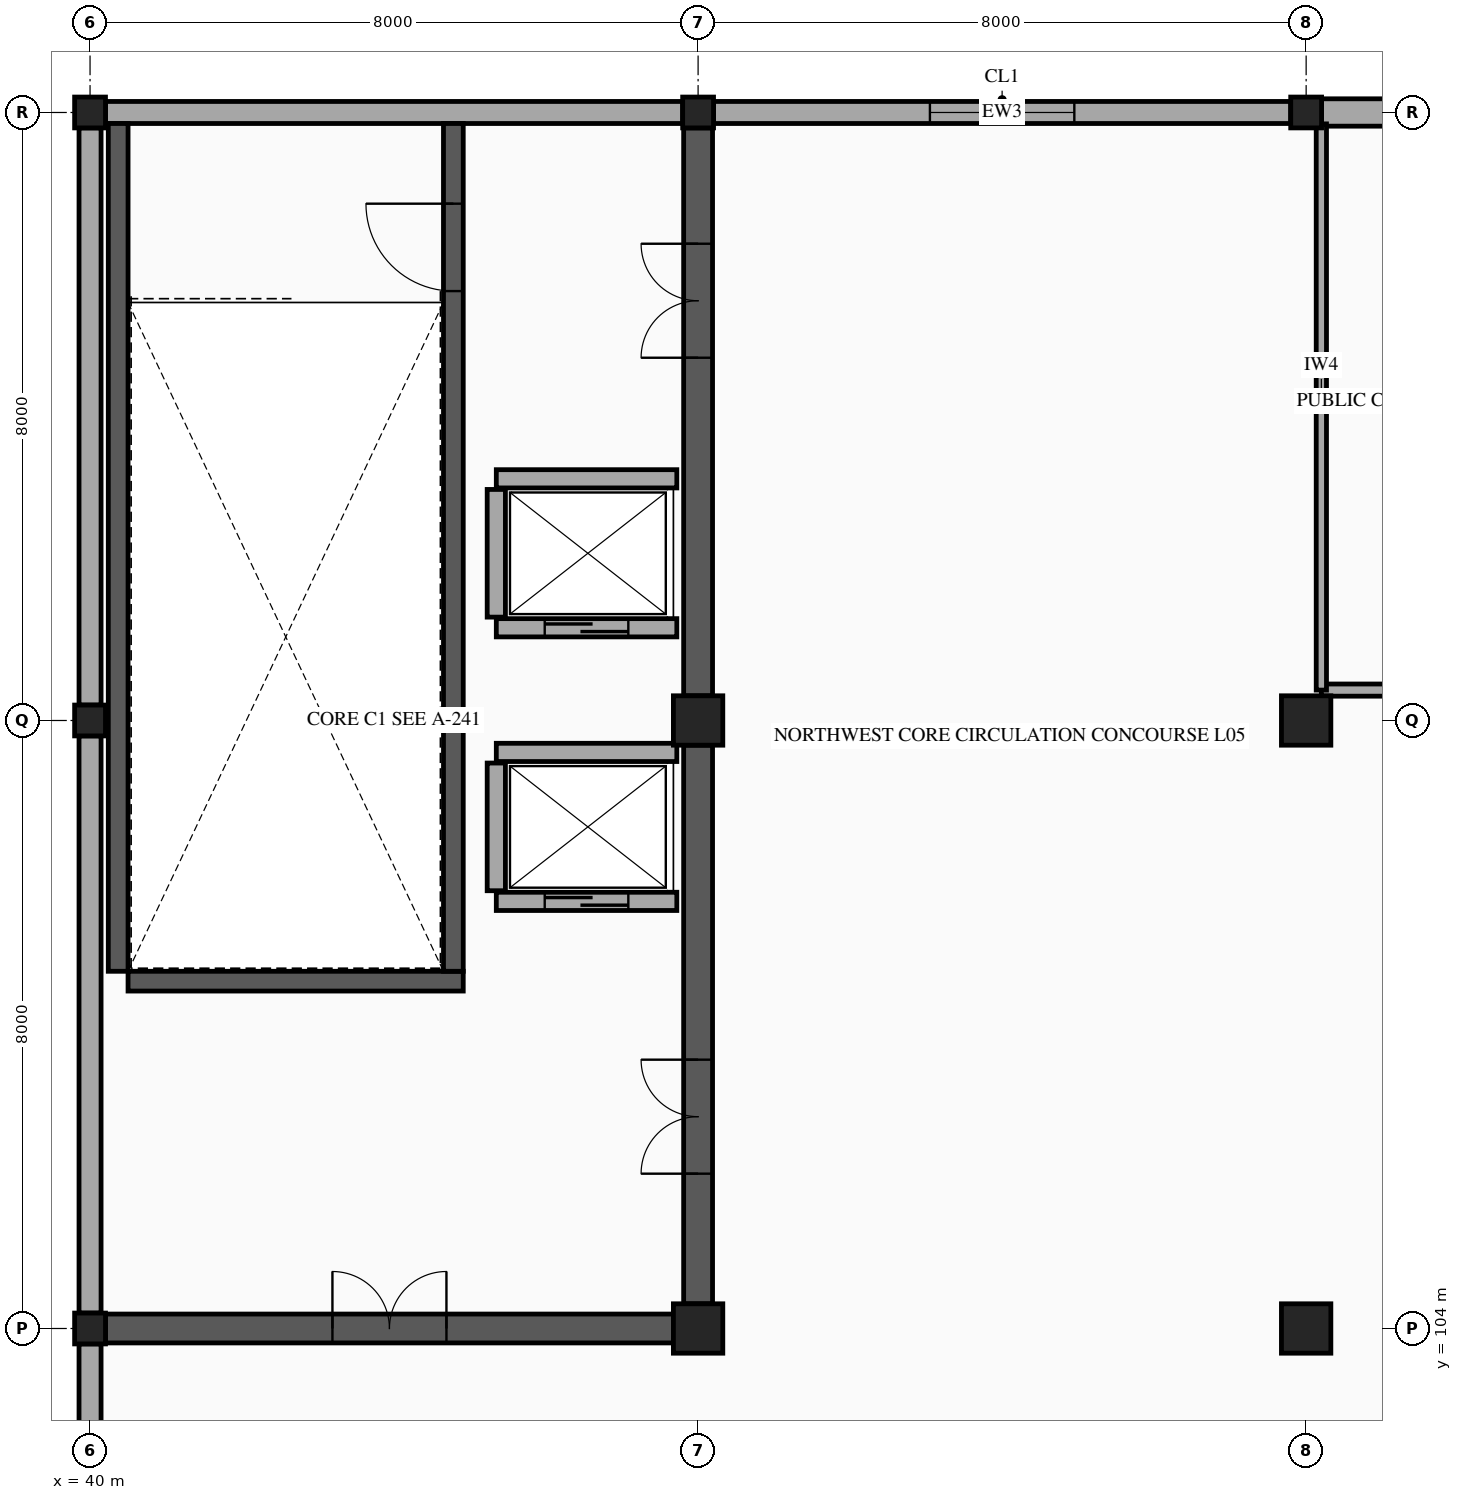
"""IFC4 building model, lengths in metres.
Left out: names, types, materials, properties, quantities, classifications, styles, units other than length and angle.
Written with IfcOpenShell. Run it as: python <this file> out.ifc"""

import sys

from ifc_helpers import new_model, si_unit, direction, frame, frame_2d, origin, origin_2d, place, context, subcontext, project, spatial, rectangle, hollow_rectangle, extrude, element, fill, save


model = new_model("IFC4")
c1 = context("Model", 3, precision=1e-05, world=origin(), true_north=direction((0.0, 1.0)))
c2 = subcontext(c1, "Body", "Model", "MODEL_VIEW")
j1 = project(units=[si_unit("LENGTHUNIT", "METRE"), si_unit("PLANEANGLEUNIT", "RADIAN")], contexts=[c1])
p1 = place(None, origin())
s1 = spatial("IfcSite", under=j1, at=p1, CompositionType="ELEMENT")
p2 = place(p1, origin())
s2 = spatial("IfcBuilding", under=s1, at=p2, CompositionType="ELEMENT")
p3 = place(p2, frame((0.0, 0.0, 23.9)))
s3 = spatial("IfcBuildingStorey", under=s2, at=p3, CompositionType="ELEMENT", Elevation=23.9)
for number, where, z_axis, x_axis in (
    (1, (40.0, 104.0, 0.0), (0.0, 0.0, 1.0), (1.0, 0.0, 0.0)),
    (2, (40.0, 112.0, 0.0), (0.0, 0.0, 1.0), (1.0, 0.0, 0.0)),
    (3, (40.0, 120.0, 0.0), (0.0, 0.0, 1.0), (1.0, 0.0, 0.0)),
):
    element("IfcColumn", number, at=place(p3, frame(where, z_axis=z_axis, x_axis=x_axis)), inside=s3, PredefinedType="COLUMN", context=c2, shape_type="SweptSolid", body=[
        extrude(hollow_rectangle(XDim=0.406, YDim=0.406, WallThickness=0.015, InnerFilletRadius=0.015, OuterFilletRadius=0.029, at=origin_2d()), origin(), (0.0, 0.0, 1.0), 4.5),
    ])
for number, where, z_axis, x_axis in (
    (4, (48.0, 104.0, 0.0), (0.0, 0.0, 1.0), (1.0, 0.0, 0.0)),
    (5, (48.0, 112.0, 0.0), (0.0, 0.0, 1.0), (1.0, 0.0, 0.0)),
):
    element("IfcColumn", number, at=place(p3, frame(where, z_axis=z_axis, x_axis=x_axis)), inside=s3, PredefinedType="COLUMN", context=c2, shape_type="SweptSolid", body=[
        extrude(rectangle(XDim=0.65, YDim=0.65, at=origin_2d()), origin(), (0.0, 0.0, 1.0), 4.5),
    ])
p4 = place(p3, frame((48.0, 120.0, 0.0), z_axis=(0.0, 0.0, 1.0), x_axis=(1.0, 0.0, 0.0)))
e6 = element("IfcColumn", 6, at=p4, inside=s3, PredefinedType="COLUMN", context=c2, shape_type="SweptSolid", body=[
    extrude(hollow_rectangle(XDim=0.406, YDim=0.406, WallThickness=0.015, InnerFilletRadius=0.015, OuterFilletRadius=0.029, at=origin_2d()), origin(), (0.0, 0.0, 1.0), 4.5),
])
for number, where, z_axis, x_axis in (
    (7, (56.0, 104.0, 0.0), (0.0, 0.0, 1.0), (1.0, 0.0, 0.0)),
    (8, (56.0, 112.0, 0.0), (0.0, 0.0, 1.0), (1.0, 0.0, 0.0)),
):
    element("IfcColumn", number, at=place(p3, frame(where, z_axis=z_axis, x_axis=x_axis)), inside=s3, PredefinedType="COLUMN", context=c2, shape_type="SweptSolid", body=[
        extrude(rectangle(XDim=0.65, YDim=0.65, at=origin_2d()), origin(), (0.0, 0.0, 1.0), 4.5),
    ])
p5 = place(p3, frame((56.0, 120.0, 0.0), z_axis=(0.0, 0.0, 1.0), x_axis=(1.0, 0.0, 0.0)))
e9 = element("IfcColumn", 9, at=p5, inside=s3, PredefinedType="COLUMN", context=c2, shape_type="SweptSolid", body=[
    extrude(hollow_rectangle(XDim=0.406, YDim=0.406, WallThickness=0.015, InnerFilletRadius=0.015, OuterFilletRadius=0.029, at=origin_2d()), origin(), (0.0, 0.0, 1.0), 4.5),
])
p6 = place(p3, frame((40.0, 96.203, 0.0), z_axis=(0.0, 0.0, 1.0), x_axis=(0.0, 1.0, 0.0)))
e10 = element("IfcWall", 10, at=p6, inside=s3, PredefinedType="STANDARD", context=c2, shape_type="SweptSolid", body=[
    extrude(rectangle(XDim=7.594, YDim=0.29, at=frame_2d((3.797, 0.0))), origin(), (0.0, 0.0, 1.0), 3.48),
])
p7 = place(p6, frame((2.597, 0.0, 0.8)))
e11 = element("IfcOpeningElement", 11, at=p7, cuts=e10, PredefinedType="OPENING", context=c2, shape_type="SweptSolid", body=[
    extrude(rectangle(XDim=2.4, YDim=1.8, at=frame_2d((1.2, 0.9))), frame((0.0, 0.155, 0.0), z_axis=(0.0, -1.0, 0.0), x_axis=(1.0, 0.0, 0.0)), (0.0, 0.0, 1.0), 0.31),
])
for number, where, z_axis, x_axis in (
    (12, (40.0, 104.203, 0.0), (0.0, 0.0, 1.0), (0.0, 1.0, 0.0)),
    (13, (40.0, 112.203, 0.0), (0.0, 0.0, 1.0), (0.0, 1.0, 0.0)),
    (14, (40.203, 120.0, 0.0), (0.0, 0.0, 1.0), (1.0, 0.0, 0.0)),
):
    element("IfcWall", number, at=place(p3, frame(where, z_axis=z_axis, x_axis=x_axis)), inside=s3, PredefinedType="STANDARD", context=c2, shape_type="SweptSolid", body=[
        extrude(rectangle(XDim=7.594, YDim=0.29, at=frame_2d((3.797, 0.0))), origin(), (0.0, 0.0, 1.0), 3.48),
    ])
p8 = place(p3, frame((48.203, 120.0, 0.0), z_axis=(0.0, 0.0, 1.0), x_axis=(1.0, 0.0, 0.0)))
e15 = element("IfcWall", 15, at=p8, inside=s3, PredefinedType="STANDARD", context=c2, shape_type="SweptSolid", body=[
    extrude(rectangle(XDim=7.594, YDim=0.29, at=frame_2d((3.797, 0.0))), origin(), (0.0, 0.0, 1.0), 3.48),
])
p9 = place(p8, frame((2.847, 0.0, 0.8)))
e16 = element("IfcOpeningElement", 16, at=p9, cuts=e15, PredefinedType="OPENING", context=c2, shape_type="SweptSolid", body=[
    extrude(rectangle(XDim=1.9, YDim=1.85, at=frame_2d((0.95, 0.925))), frame((0.0, 0.155, 0.0), z_axis=(0.0, -1.0, 0.0), x_axis=(1.0, 0.0, 0.0)), (0.0, 0.0, 1.0), 0.31),
])
p10 = place(p3, frame((56.203, 120.0, 0.0), z_axis=(0.0, 0.0, 1.0), x_axis=(1.0, 0.0, 0.0)))
e17 = element("IfcWall", 17, at=p10, inside=s3, PredefinedType="SOLIDWALL", context=c2, shape_type="SweptSolid", body=[
    extrude(rectangle(XDim=7.594, YDim=0.36, at=frame_2d((3.797, 0.0))), origin(), (0.0, 0.0, 1.0), 3.48),
])
p11 = place(p3, frame((40.5, 108.57, 0.0), z_axis=(0.0, 0.0, 1.0), x_axis=(1.0, 0.0, 0.0)))
e18 = element("IfcWall", 18, at=p11, inside=s3, PredefinedType="SHEAR", context=c2, shape_type="SweptSolid", body=[
    extrude(rectangle(XDim=4.41, YDim=0.26, at=frame_2d((2.205, 0.0))), origin(), (0.0, 0.0, 1.0), 4.28),
])
p12 = place(p3, frame((40.37, 108.7, 0.0), z_axis=(0.0, 0.0, 1.0), x_axis=(0.0, 1.0, 0.0)))
e19 = element("IfcWall", 19, at=p12, inside=s3, PredefinedType="SHEAR", context=c2, shape_type="SweptSolid", body=[
    extrude(rectangle(XDim=11.155, YDim=0.26, at=frame_2d((5.578, 0.0))), origin(), (0.0, 0.0, 1.0), 4.28),
])
p13 = place(p3, frame((44.78, 108.7, 0.0), z_axis=(0.0, 0.0, 1.0), x_axis=(0.0, 1.0, 0.0)))
e20 = element("IfcWall", 20, at=p13, inside=s3, PredefinedType="SHEAR", context=c2, shape_type="SweptSolid", body=[
    extrude(rectangle(XDim=11.155, YDim=0.26, at=frame_2d((5.578, 0.0))), origin(), (0.0, 0.0, 1.0), 4.28),
])
p14 = place(p13, frame((8.95, 0.0, 0.0)))
e21 = element("IfcOpeningElement", 21, at=p14, cuts=e20, PredefinedType="OPENING", context=c2, shape_type="SweptSolid", body=[
    extrude(rectangle(XDim=1.15, YDim=2.15, at=frame_2d((0.575, 1.075))), frame((0.0, 0.14, 0.0), z_axis=(0.0, -1.0, 0.0), x_axis=(1.0, 0.0, 0.0)), (0.0, 0.0, 1.0), 0.28),
])
p15 = place(p3, frame((40.203, 104.0, 0.0), z_axis=(0.0, 0.0, 1.0), x_axis=(1.0, 0.0, 0.0)))
e22 = element("IfcWall", 22, at=p15, inside=s3, PredefinedType="SHEAR", context=c2, shape_type="SweptSolid", body=[
    extrude(rectangle(XDim=7.472, YDim=0.38, at=frame_2d((3.736, 0.0))), origin(), (0.0, 0.0, 1.0), 4.28),
])
p16 = place(p15, frame((2.986, 0.0, 0.0)))
e23 = element("IfcOpeningElement", 23, at=p16, cuts=e22, PredefinedType="OPENING", context=c2, shape_type="SweptSolid", body=[
    extrude(rectangle(XDim=1.5, YDim=2.15, at=frame_2d((0.75, 1.075))), frame((0.0, 0.2, 0.0), z_axis=(0.0, -1.0, 0.0), x_axis=(1.0, 0.0, 0.0)), (0.0, 0.0, 1.0), 0.4),
])
p17 = place(p3, frame((48.0, 104.325, 0.0), z_axis=(0.0, 0.0, 1.0), x_axis=(0.0, 1.0, 0.0)))
e24 = element("IfcWall", 24, at=p17, inside=s3, PredefinedType="SHEAR", context=c2, shape_type="SweptSolid", body=[
    extrude(rectangle(XDim=7.35, YDim=0.38, at=frame_2d((3.675, 0.0))), origin(), (0.0, 0.0, 1.0), 4.28),
])
p18 = place(p17, frame((1.712, 0.0, 0.0)))
e25 = element("IfcOpeningElement", 25, at=p18, cuts=e24, PredefinedType="OPENING", context=c2, shape_type="SweptSolid", body=[
    extrude(rectangle(XDim=1.5, YDim=2.15, at=frame_2d((0.75, 1.075))), frame((0.0, 0.2, 0.0), z_axis=(0.0, -1.0, 0.0), x_axis=(1.0, 0.0, 0.0)), (0.0, 0.0, 1.0), 0.4),
])
p19 = place(p3, frame((48.0, 112.325, 0.0), z_axis=(0.0, 0.0, 1.0), x_axis=(0.0, 1.0, 0.0)))
e26 = element("IfcWall", 26, at=p19, inside=s3, PredefinedType="SHEAR", context=c2, shape_type="SweptSolid", body=[
    extrude(rectangle(XDim=7.472, YDim=0.38, at=frame_2d((3.736, 0.0))), origin(), (0.0, 0.0, 1.0), 4.28),
])
p20 = place(p19, frame((4.448, 0.0, 0.0)))
e27 = element("IfcOpeningElement", 27, at=p20, cuts=e26, PredefinedType="OPENING", context=c2, shape_type="SweptSolid", body=[
    extrude(rectangle(XDim=1.5, YDim=2.15, at=frame_2d((0.75, 1.075))), frame((0.0, 0.2, 0.0), z_axis=(0.0, -1.0, 0.0), x_axis=(1.0, 0.0, 0.0)), (0.0, 0.0, 1.0), 0.4),
])
p21 = place(p3, frame((45.345, 113.22, 0.0), z_axis=(0.0, 0.0, 1.0), x_axis=(1.0, 0.0, 0.0)))
e28 = element("IfcWall", 28, at=p21, inside=s3, PredefinedType="PARTITIONING", context=c2, shape_type="SweptSolid", body=[
    extrude(rectangle(XDim=2.375, YDim=0.24, at=frame_2d((1.188, 0.0))), origin(), (0.0, 0.0, 1.0), 4.28),
])
p22 = place(p21, frame((0.637, 0.0, 0.0)))
e29 = element("IfcOpeningElement", 29, at=p22, cuts=e28, PredefinedType="OPENING", context=c2, shape_type="SweptSolid", body=[
    extrude(rectangle(XDim=1.1, YDim=2.15, at=frame_2d((0.55, 1.075))), frame((0.0, 0.13, 0.0), z_axis=(0.0, -1.0, 0.0), x_axis=(1.0, 0.0, 0.0)), (0.0, 0.0, 1.0), 0.26),
])
p23 = place(p3, frame((45.345, 115.18, 0.0), z_axis=(0.0, 0.0, 1.0), x_axis=(1.0, 0.0, 0.0)))
e30 = element("IfcWall", 30, at=p23, inside=s3, PredefinedType="PARTITIONING", context=c2, shape_type="SweptSolid", body=[
    extrude(rectangle(XDim=2.375, YDim=0.24, at=frame_2d((1.188, 0.0))), origin(), (0.0, 0.0, 1.0), 4.28),
])
p24 = place(p3, frame((45.345, 113.36, 0.0), z_axis=(0.0, 0.0, 1.0), x_axis=(0.0, 1.0, 0.0)))
e31 = element("IfcWall", 31, at=p24, inside=s3, PredefinedType="PARTITIONING", context=c2, shape_type="SweptSolid", body=[
    extrude(rectangle(XDim=1.68, YDim=0.24, at=frame_2d((0.84, 0.0))), origin(), (0.0, 0.0, 1.0), 4.28),
])
p25 = place(p3, frame((45.345, 109.62, 0.0), z_axis=(0.0, 0.0, 1.0), x_axis=(1.0, 0.0, 0.0)))
e32 = element("IfcWall", 32, at=p25, inside=s3, PredefinedType="PARTITIONING", context=c2, shape_type="SweptSolid", body=[
    extrude(rectangle(XDim=2.375, YDim=0.24, at=frame_2d((1.188, 0.0))), origin(), (0.0, 0.0, 1.0), 4.28),
])
p26 = place(p25, frame((0.637, 0.0, 0.0)))
e33 = element("IfcOpeningElement", 33, at=p26, cuts=e32, PredefinedType="OPENING", context=c2, shape_type="SweptSolid", body=[
    extrude(rectangle(XDim=1.1, YDim=2.15, at=frame_2d((0.55, 1.075))), frame((0.0, 0.13, 0.0), z_axis=(0.0, -1.0, 0.0), x_axis=(1.0, 0.0, 0.0)), (0.0, 0.0, 1.0), 0.26),
])
p27 = place(p3, frame((45.345, 111.58, 0.0), z_axis=(0.0, 0.0, 1.0), x_axis=(1.0, 0.0, 0.0)))
e34 = element("IfcWall", 34, at=p27, inside=s3, PredefinedType="PARTITIONING", context=c2, shape_type="SweptSolid", body=[
    extrude(rectangle(XDim=2.375, YDim=0.24, at=frame_2d((1.188, 0.0))), origin(), (0.0, 0.0, 1.0), 4.28),
])
p28 = place(p3, frame((45.345, 109.76, 0.0), z_axis=(0.0, 0.0, 1.0), x_axis=(0.0, 1.0, 0.0)))
e35 = element("IfcWall", 35, at=p28, inside=s3, PredefinedType="PARTITIONING", context=c2, shape_type="SweptSolid", body=[
    extrude(rectangle(XDim=1.68, YDim=0.24, at=frame_2d((0.84, 0.0))), origin(), (0.0, 0.0, 1.0), 4.28),
])
p29 = place(p3, frame((56.2, 112.4, 0.0), z_axis=(0.0, 0.0, 1.0), x_axis=(1.0, 0.0, 0.0)))
e36 = element("IfcWall", 36, at=p29, inside=s3, PredefinedType="PARTITIONING", context=c2, shape_type="SweptSolid", body=[
    extrude(rectangle(XDim=4.7, YDim=0.16, at=frame_2d((2.35, 0.0))), origin(), (0.0, 0.0, 1.0), 3.48),
])
p30 = place(p29, frame((3.193, 0.0, 0.0)))
e37 = element("IfcOpeningElement", 37, at=p30, cuts=e36, PredefinedType="OPENING", context=c2, shape_type="SweptSolid", body=[
    extrude(rectangle(XDim=0.92, YDim=2.1, at=frame_2d((0.46, 1.05))), frame((0.0, 0.09, 0.0), z_axis=(0.0, -1.0, 0.0), x_axis=(1.0, 0.0, 0.0)), (0.0, 0.0, 1.0), 0.18),
])
p31 = place(p3, frame((56.2, 112.4, 0.0), z_axis=(0.0, 0.0, 1.0), x_axis=(0.0, 1.0, 0.0)))
e38 = element("IfcWall", 38, at=p31, inside=s3, PredefinedType="PARTITIONING", context=c2, shape_type="SweptSolid", body=[
    extrude(rectangle(XDim=7.45, YDim=0.135, at=frame_2d((3.725, 0.0))), origin(), (0.0, 0.0, 1.0), 3.48),
])
p32 = place(p9, origin())
e39 = element("IfcWindow", 39, at=p32, inside=s3, PartitioningType="SINGLE_PANEL", PredefinedType="WINDOW", context=c2, shape_type="SweptSolid", body=[
    extrude(rectangle(XDim=1.9, YDim=1.85, at=frame_2d((0.95, 0.925))), frame((0.0, 0.03, 0.0), z_axis=(0.0, -1.0, 0.0), x_axis=(1.0, 0.0, 0.0)), (0.0, 0.0, 1.0), 0.06),
])
fill(e16, e39)
p33 = place(p14, origin())
e40 = element("IfcDoor", 40, at=p33, inside=s3, OperationType="SINGLE_SWING_RIGHT", PredefinedType="DOOR", context=c2, shape_type="SweptSolid", body=[
    extrude(rectangle(XDim=1.15, YDim=2.15, at=frame_2d((0.575, 1.075))), frame((0.0, 0.025, 0.0), z_axis=(0.0, -1.0, 0.0), x_axis=(1.0, 0.0, 0.0)), (0.0, 0.0, 1.0), 0.05),
])
fill(e21, e40)
p34 = place(p16, origin())
e41 = element("IfcDoor", 41, at=p34, inside=s3, OperationType="DOUBLE_DOOR_SINGLE_SWING", PredefinedType="DOOR", context=c2, shape_type="SweptSolid", body=[
    extrude(rectangle(XDim=1.5, YDim=2.15, at=frame_2d((0.75, 1.075))), frame((0.0, 0.025, 0.0), z_axis=(0.0, -1.0, 0.0), x_axis=(1.0, 0.0, 0.0)), (0.0, 0.0, 1.0), 0.05),
])
fill(e23, e41)
p35 = place(p18, origin())
e42 = element("IfcDoor", 42, at=p35, inside=s3, OperationType="DOUBLE_DOOR_SINGLE_SWING", PredefinedType="DOOR", context=c2, shape_type="SweptSolid", body=[
    extrude(rectangle(XDim=1.5, YDim=2.15, at=frame_2d((0.75, 1.075))), frame((0.0, 0.025, 0.0), z_axis=(0.0, -1.0, 0.0), x_axis=(1.0, 0.0, 0.0)), (0.0, 0.0, 1.0), 0.05),
])
fill(e25, e42)
p36 = place(p20, origin())
e43 = element("IfcDoor", 43, at=p36, inside=s3, OperationType="DOUBLE_DOOR_SINGLE_SWING", PredefinedType="DOOR", context=c2, shape_type="SweptSolid", body=[
    extrude(rectangle(XDim=1.5, YDim=2.15, at=frame_2d((0.75, 1.075))), frame((0.0, 0.025, 0.0), z_axis=(0.0, -1.0, 0.0), x_axis=(1.0, 0.0, 0.0)), (0.0, 0.0, 1.0), 0.05),
])
fill(e27, e43)
p37 = place(p22, origin())
e44 = element("IfcDoor", 44, at=p37, inside=s3, OperationType="SLIDING_TO_LEFT", PredefinedType="DOOR", context=c2, shape_type="SweptSolid", body=[
    extrude(rectangle(XDim=1.1, YDim=2.15, at=frame_2d((0.55, 1.075))), frame((0.0, 0.025, 0.0), z_axis=(0.0, -1.0, 0.0), x_axis=(1.0, 0.0, 0.0)), (0.0, 0.0, 1.0), 0.05),
])
fill(e29, e44)
p38 = place(p26, origin())
e45 = element("IfcDoor", 45, at=p38, inside=s3, OperationType="SLIDING_TO_LEFT", PredefinedType="DOOR", context=c2, shape_type="SweptSolid", body=[
    extrude(rectangle(XDim=1.1, YDim=2.15, at=frame_2d((0.55, 1.075))), frame((0.0, 0.025, 0.0), z_axis=(0.0, -1.0, 0.0), x_axis=(1.0, 0.0, 0.0)), (0.0, 0.0, 1.0), 0.05),
])
fill(e33, e45)
save(model, sys.argv[1])
